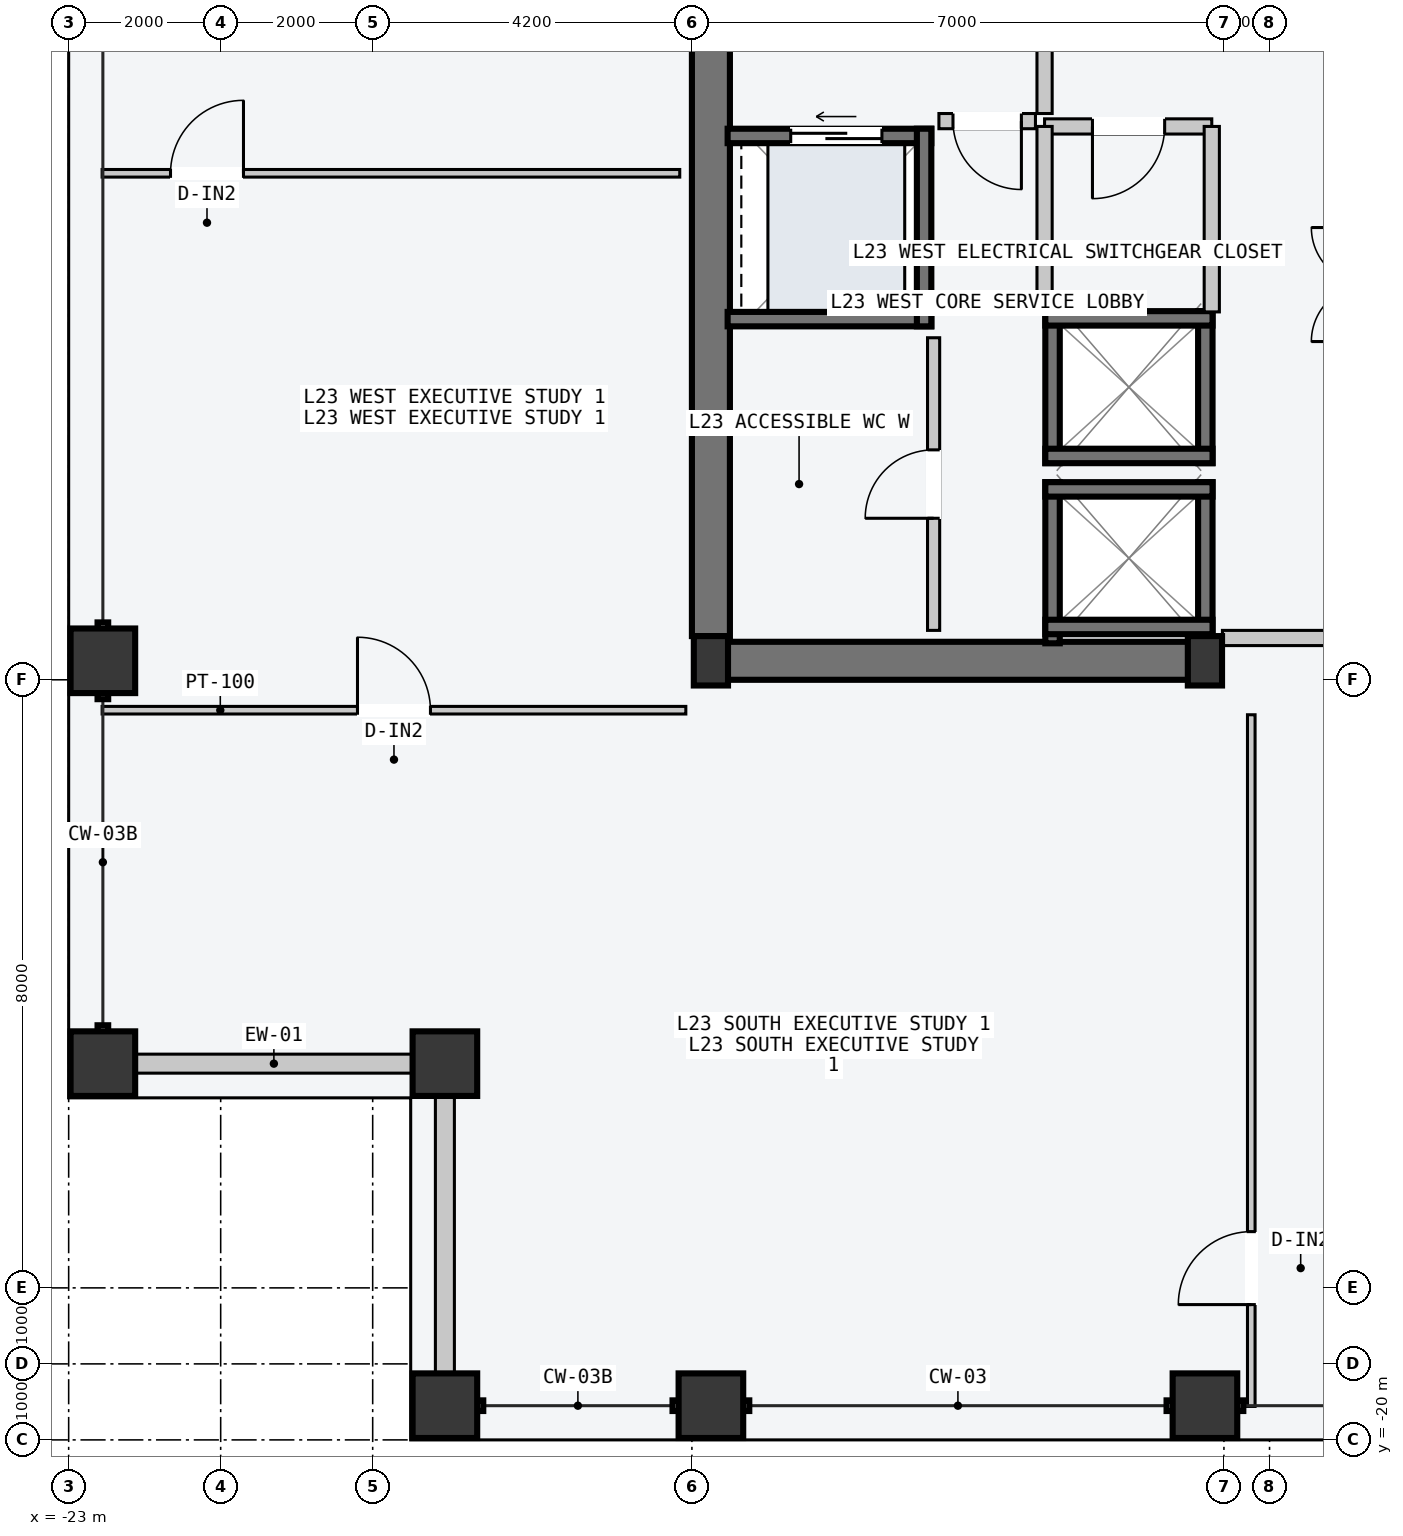
"""IFC4 building model, lengths in metres.
Left out: names, types, materials, properties, quantities, classifications, styles, units other than length and angle.
Written with IfcOpenShell. Run it as: python <this file> out.ifc"""

import sys

from ifc_helpers import new_model, si_unit, direction, frame, frame_2d, origin, origin_2d, place, context, subcontext, project, spatial, rectangle, hollow_rectangle, i_section, extrude, element, fill, save


model = new_model("IFC4")
c1 = context("Model", 3, precision=1e-05, world=origin(), true_north=direction((0.0, 1.0)))
c2 = subcontext(c1, "Body", "Model", "MODEL_VIEW")
j1 = project(units=[si_unit("LENGTHUNIT", "METRE"), si_unit("PLANEANGLEUNIT", "RADIAN")], contexts=[c1])
p1 = place(None, origin())
s1 = spatial("IfcSite", under=j1, at=p1, CompositionType="ELEMENT")
p2 = place(p1, origin())
s2 = spatial("IfcBuilding", under=s1, at=p2, CompositionType="ELEMENT")
p3 = place(p2, frame((0.0, 0.0, 91.8)))
s3 = spatial("IfcBuildingStorey", under=s2, at=p3, CompositionType="ELEMENT", Elevation=91.8)
p4 = place(p3, frame((-14.53, -9.75, -0.2), z_axis=(0.0, 0.0, 1.0), x_axis=(1.0, 0.0, 0.0)))
e1 = element("IfcWall", 1, at=p4, inside=s3, PredefinedType="SHEAR", context=c2, shape_type="SweptSolid", body=[
    extrude(rectangle(XDim=6.46, YDim=0.5, at=frame_2d((3.23, 0.0))), origin(), (0.0, 0.0, 1.0), 3.6),
])
p5 = place(p3, frame((-14.55, -9.425, -0.2), z_axis=(0.0, 0.0, 1.0), x_axis=(0.0, 1.0, 0.0)))
e2 = element("IfcWall", 2, at=p5, inside=s3, PredefinedType="SHEAR", context=c2, shape_type="SweptSolid", body=[
    extrude(rectangle(XDim=9.1, YDim=0.5, at=frame_2d((4.55, 0.0))), origin(), (0.0, 0.0, 1.0), 3.6),
])
for number, where, z_axis, x_axis in (
    (3, (-14.55, -9.75, 0.0), (0.0, 0.0, 1.0), (1.0, 0.0, 0.0)),
    (4, (-8.05, -9.75, 0.0), (0.0, 0.0, 1.0), (1.0, 0.0, 0.0)),
):
    element("IfcColumn", number, at=place(p3, frame(where, z_axis=z_axis, x_axis=x_axis)), inside=s3, PredefinedType="COLUMN", context=c2, shape_type="SweptSolid", body=[
        extrude(i_section(OverallWidth=0.45, OverallDepth=0.65, WebThickness=0.025, FlangeThickness=0.04, at=origin_2d()), origin(), (0.0, 0.0, 1.0), 3.6),
    ])
for number, where, z_axis, x_axis in (
    (5, (-18.05, -19.55, 0.0), (0.0, 0.0, 1.0), (1.0, 0.0, 0.0)),
    (6, (-14.55, -19.55, 0.0), (0.0, 0.0, 1.0), (1.0, 0.0, 0.0)),
    (7, (-8.05, -19.55, 0.0), (0.0, 0.0, 1.0), (1.0, 0.0, 0.0)),
    (8, (-22.55, -15.05, 0.0), (0.0, 0.0, 1.0), (0.0, 1.0, 0.0)),
    (9, (-22.55, -9.75, 0.0), (0.0, 0.0, 1.0), (0.0, 1.0, 0.0)),
    (10, (-18.05, -15.05, 0.0), (0.0, 0.0, 1.0), (1.0, 0.0, 0.0)),
):
    element("IfcColumn", number, at=place(p3, frame(where, z_axis=z_axis, x_axis=x_axis)), inside=s3, PredefinedType="COLUMN", context=c2, shape_type="SweptSolid", body=[
        extrude(hollow_rectangle(XDim=0.85, YDim=0.85, WallThickness=0.04, at=origin_2d()), origin(), (0.0, 0.0, 1.0), 3.6),
    ])
for number, where, z_axis, x_axis in (
    (11, (-22.115, -15.05, 0.0), (0.0, 0.0, 1.0), (1.0, 0.0, 0.0)),
    (12, (-18.05, -19.115, 0.0), (0.0, 0.0, 1.0), (0.0, 1.0, 0.0)),
):
    element("IfcWall", number, at=place(p3, frame(where, z_axis=z_axis, x_axis=x_axis)), inside=s3, PredefinedType="STANDARD", context=c2, shape_type="SweptSolid", body=[
        extrude(rectangle(XDim=3.63, YDim=0.25, at=frame_2d((1.815, 0.0))), origin(), (0.0, 0.0, 1.0), 2.7),
    ])
for number, where, z_axis, x_axis in (
    (13, (-8.045, -9.52, -0.2), (0.0, 0.0, 1.0), (0.0, 1.0, 0.0)),
    (14, (-10.055, -9.52, -0.2), (0.0, 0.0, 1.0), (0.0, 1.0, 0.0)),
):
    element("IfcWall", number, at=place(p3, frame(where, z_axis=z_axis, x_axis=x_axis)), inside=s3, PredefinedType="SOLIDWALL", context=c2, shape_type="SweptSolid", body=[
        extrude(rectangle(XDim=2.12, YDim=0.19, at=frame_2d((1.06, 0.0))), origin(), (0.0, 0.0, 1.0), 3.6),
    ])
for number, where, z_axis, x_axis in (
    (15, (-10.15, -7.495, -0.2), (0.0, 0.0, 1.0), (1.0, 0.0, 0.0)),
    (16, (-10.15, -9.305, -0.2), (0.0, 0.0, 1.0), (1.0, 0.0, 0.0)),
):
    element("IfcWall", number, at=place(p3, frame(where, z_axis=z_axis, x_axis=x_axis)), inside=s3, PredefinedType="SOLIDWALL", context=c2, shape_type="SweptSolid", body=[
        extrude(rectangle(XDim=2.2, YDim=0.19, at=frame_2d((1.1, 0.0))), origin(), (0.0, 0.0, 1.0), 3.6),
    ])
for number, where, z_axis, x_axis in (
    (17, (-8.045, -7.15, -0.2), (0.0, 0.0, 1.0), (0.0, 1.0, 0.0)),
    (18, (-10.055, -7.15, -0.2), (0.0, 0.0, 1.0), (0.0, 1.0, 0.0)),
):
    element("IfcWall", number, at=place(p3, frame(where, z_axis=z_axis, x_axis=x_axis)), inside=s3, PredefinedType="SOLIDWALL", context=c2, shape_type="SweptSolid", body=[
        extrude(rectangle(XDim=2.0, YDim=0.19, at=frame_2d((1.0, 0.0))), origin(), (0.0, 0.0, 1.0), 3.6),
    ])
for number, where, z_axis, x_axis in (
    (19, (-10.15, -5.245, -0.2), (0.0, 0.0, 1.0), (1.0, 0.0, 0.0)),
    (20, (-10.15, -7.055, -0.2), (0.0, 0.0, 1.0), (1.0, 0.0, 0.0)),
):
    element("IfcWall", number, at=place(p3, frame(where, z_axis=z_axis, x_axis=x_axis)), inside=s3, PredefinedType="SOLIDWALL", context=c2, shape_type="SweptSolid", body=[
        extrude(rectangle(XDim=2.2, YDim=0.19, at=frame_2d((1.1, 0.0))), origin(), (0.0, 0.0, 1.0), 3.6),
    ])
p6 = place(p3, frame((-14.33, -2.845, -0.2), z_axis=(0.0, 0.0, 1.0), x_axis=(1.0, 0.0, 0.0)))
e21 = element("IfcWall", 21, at=p6, inside=s3, PredefinedType="SOLIDWALL", context=c2, shape_type="SweptSolid", body=[
    extrude(rectangle(XDim=2.68, YDim=0.19, at=frame_2d((1.34, 0.0))), origin(), (0.0, 0.0, 1.0), 3.6),
])
p7 = place(p6, frame((0.83, 0.0, 0.2)))
e22 = element("IfcOpeningElement", 22, at=p7, cuts=e21, PredefinedType="OPENING", context=c2, shape_type="SweptSolid", body=[
    extrude(rectangle(XDim=1.2, YDim=2.2, at=frame_2d((0.6, 1.1))), frame((0.0, 0.105, 0.0), z_axis=(0.0, -1.0, 0.0), x_axis=(1.0, 0.0, 0.0)), (0.0, 0.0, 1.0), 0.21),
])
p8 = place(p3, frame((-14.33, -5.255, -0.2), z_axis=(0.0, 0.0, 1.0), x_axis=(1.0, 0.0, 0.0)))
e23 = element("IfcWall", 23, at=p8, inside=s3, PredefinedType="SOLIDWALL", context=c2, shape_type="SweptSolid", body=[
    extrude(rectangle(XDim=2.68, YDim=0.19, at=frame_2d((1.34, 0.0))), origin(), (0.0, 0.0, 1.0), 3.6),
])
p9 = place(p3, frame((-11.745, -5.35, -0.2), z_axis=(0.0, 0.0, 1.0), x_axis=(0.0, 1.0, 0.0)))
e24 = element("IfcWall", 24, at=p9, inside=s3, PredefinedType="SOLIDWALL", context=c2, shape_type="SweptSolid", body=[
    extrude(rectangle(XDim=2.6, YDim=0.19, at=frame_2d((1.3, 0.0))), origin(), (0.0, 0.0, 1.0), 3.6),
])
p10 = place(p3, frame((-6.02, -9.45, 0.0), z_axis=(0.0, 0.0, 1.0), x_axis=(-1.0, 0.0, 0.0)))
e25 = element("IfcWall", 25, at=p10, inside=s3, PredefinedType="PARTITIONING", context=c2, shape_type="SweptSolid", body=[
    extrude(rectangle(XDim=1.8, YDim=0.2, at=frame_2d((0.9, 0.0))), origin(), (0.0, 0.0, 1.0), 3.4),
])
p11 = place(p3, frame((-10.16, -2.55, 0.0), z_axis=(0.0, 0.0, 1.0), x_axis=(0.0, 1.0, 0.0)))
e26 = element("IfcWall", 26, at=p11, inside=s3, PredefinedType="PARTITIONING", context=c2, shape_type="SweptSolid", body=[
    extrude(rectangle(XDim=3.4, YDim=0.2, at=frame_2d((1.7, 0.0))), origin(), (0.0, 0.0, 1.0), 3.4),
])
p12 = place(p11, frame((1.3, 0.0, 0.0)))
e27 = element("IfcOpeningElement", 27, at=p12, cuts=e26, PredefinedType="OPENING", context=c2, shape_type="SweptSolid", body=[
    extrude(rectangle(XDim=1.1, YDim=2.15, at=frame_2d((0.55, 1.075))), frame((0.0, 0.11, 0.0), z_axis=(0.0, -1.0, 0.0), x_axis=(1.0, 0.0, 0.0)), (0.0, 0.0, 1.0), 0.22),
])
p13 = place(p3, frame((-10.28, -2.65, 0.0), z_axis=(0.0, 0.0, 1.0), x_axis=(-1.0, 0.0, 0.0)))
e28 = element("IfcWall", 28, at=p13, inside=s3, PredefinedType="PARTITIONING", context=c2, shape_type="SweptSolid", body=[
    extrude(rectangle(XDim=1.27, YDim=0.2, at=frame_2d((0.635, 0.0))), origin(), (0.0, 0.0, 1.0), 3.4),
])
p14 = place(p13, frame((0.185, 0.0, 0.0)))
e29 = element("IfcOpeningElement", 29, at=p14, cuts=e28, PredefinedType="OPENING", context=c2, shape_type="SweptSolid", body=[
    extrude(rectangle(XDim=0.9, YDim=2.15, at=frame_2d((0.45, 1.075))), frame((0.0, 0.11, 0.0), z_axis=(0.0, -1.0, 0.0), x_axis=(1.0, 0.0, 0.0)), (0.0, 0.0, 1.0), 0.22),
])
p15 = place(p3, frame((-7.96, -2.72, 0.0), z_axis=(0.0, 0.0, 1.0), x_axis=(-1.0, 0.0, 0.0)))
e30 = element("IfcWall", 30, at=p15, inside=s3, PredefinedType="PARTITIONING", context=c2, shape_type="SweptSolid", body=[
    extrude(rectangle(XDim=2.2, YDim=0.2, at=frame_2d((1.1, 0.0))), origin(), (0.0, 0.0, 1.0), 3.4),
])
p16 = place(p15, frame((0.62, 0.0, 0.0)))
e31 = element("IfcOpeningElement", 31, at=p16, cuts=e30, PredefinedType="OPENING", context=c2, shape_type="SweptSolid", body=[
    extrude(rectangle(XDim=0.95, YDim=2.1, at=frame_2d((0.475, 1.05))), frame((0.0, 0.11, 0.0), z_axis=(0.0, -1.0, 0.0), x_axis=(1.0, 0.0, 0.0)), (0.0, 0.0, 1.0), 0.22),
])
for number, where, z_axis, x_axis in (
    (32, (-7.96, -5.16, 0.0), (0.0, 0.0, 1.0), (0.0, 1.0, 0.0)),
    (33, (-10.16, -5.16, 0.0), (0.0, 0.0, 1.0), (0.0, 1.0, 0.0)),
):
    element("IfcWall", number, at=place(p3, frame(where, z_axis=z_axis, x_axis=x_axis)), inside=s3, PredefinedType="PARTITIONING", context=c2, shape_type="SweptSolid", body=[
        extrude(rectangle(XDim=2.44, YDim=0.2, at=frame_2d((1.22, 0.0))), origin(), (0.0, 0.0, 1.0), 3.4),
    ])
p17 = place(p3, frame((-11.62, -9.35, 0.0), z_axis=(0.0, 0.0, 1.0), x_axis=(0.0, 1.0, 0.0)))
e34 = element("IfcWall", 34, at=p17, inside=s3, PredefinedType="PARTITIONING", context=c2, shape_type="SweptSolid", body=[
    extrude(rectangle(XDim=3.85, YDim=0.16, at=frame_2d((1.925, 0.0))), origin(), (0.0, 0.0, 1.0), 3.4),
])
p18 = place(p17, frame((1.475, 0.0, 0.0)))
e35 = element("IfcOpeningElement", 35, at=p18, cuts=e34, PredefinedType="OPENING", context=c2, shape_type="SweptSolid", body=[
    extrude(rectangle(XDim=0.9, YDim=2.15, at=frame_2d((0.45, 1.075))), frame((0.0, 0.09, 0.0), z_axis=(0.0, -1.0, 0.0), x_axis=(1.0, 0.0, 0.0)), (0.0, 0.0, 1.0), 0.18),
])
p19 = place(p3, frame((-7.44, -19.56, 0.0), z_axis=(0.0, 0.0, 1.0), x_axis=(0.0, 1.0, 0.0)))
e36 = element("IfcWall", 36, at=p19, inside=s3, PredefinedType="PARTITIONING", context=c2, shape_type="SweptSolid", body=[
    extrude(rectangle(XDim=9.1, YDim=0.1, at=frame_2d((4.55, 0.0))), origin(), (0.0, 0.0, 1.0), 3.4),
])
p20 = place(p19, frame((1.34, 0.0, 0.0)))
e37 = element("IfcOpeningElement", 37, at=p20, cuts=e36, PredefinedType="OPENING", context=c2, shape_type="SweptSolid", body=[
    extrude(rectangle(XDim=0.96, YDim=2.18, at=frame_2d((0.48, 1.09))), frame((0.0, 0.06, 0.0), z_axis=(0.0, -1.0, 0.0), x_axis=(1.0, 0.0, 0.0)), (0.0, 0.0, 1.0), 0.12),
])
p21 = place(p3, frame((-22.56, -10.4, 0.0), z_axis=(0.0, 0.0, 1.0), x_axis=(1.0, 0.0, 0.0)))
e38 = element("IfcWall", 38, at=p21, inside=s3, PredefinedType="PARTITIONING", context=c2, shape_type="SweptSolid", body=[
    extrude(rectangle(XDim=7.68, YDim=0.1, at=frame_2d((3.84, 0.0))), origin(), (0.0, 0.0, 1.0), 3.4),
])
p22 = place(p21, frame((3.36, 0.0, 0.0)))
e39 = element("IfcOpeningElement", 39, at=p22, cuts=e38, PredefinedType="OPENING", context=c2, shape_type="SweptSolid", body=[
    extrude(rectangle(XDim=0.96, YDim=2.18, at=frame_2d((0.48, 1.09))), frame((0.0, 0.06, 0.0), z_axis=(0.0, -1.0, 0.0), x_axis=(1.0, 0.0, 0.0)), (0.0, 0.0, 1.0), 0.12),
])
p23 = place(p3, frame((-22.56, -3.336, 0.0), z_axis=(0.0, 0.0, 1.0), x_axis=(1.0, 0.0, 0.0)))
e40 = element("IfcWall", 40, at=p23, inside=s3, PredefinedType="PARTITIONING", context=c2, shape_type="SweptSolid", body=[
    extrude(rectangle(XDim=7.6, YDim=0.1, at=frame_2d((3.8, 0.0))), origin(), (0.0, 0.0, 1.0), 2.95),
])
p24 = place(p23, frame((0.9, 0.0, 0.0)))
e41 = element("IfcOpeningElement", 41, at=p24, cuts=e40, PredefinedType="OPENING", context=c2, shape_type="SweptSolid", body=[
    extrude(rectangle(XDim=0.96, YDim=2.18, at=frame_2d((0.48, 1.09))), frame((0.0, 0.06, 0.0), z_axis=(0.0, -1.0, 0.0), x_axis=(1.0, 0.0, 0.0)), (0.0, 0.0, 1.0), 0.12),
])
p25 = place(p7, origin())
e42 = element("IfcDoor", 42, at=p25, inside=s3, OperationType="SLIDING_TO_LEFT", PredefinedType="DOOR", context=c2, shape_type="SweptSolid", body=[
    extrude(rectangle(XDim=1.2, YDim=2.2, at=frame_2d((0.6, 1.1))), frame((0.0, 0.025, 0.0), z_axis=(0.0, -1.0, 0.0), x_axis=(1.0, 0.0, 0.0)), (0.0, 0.0, 1.0), 0.05),
])
fill(e22, e42)
p26 = place(p14, origin())
e43 = element("IfcDoor", 43, at=p26, inside=s3, OperationType="SINGLE_SWING_LEFT", PredefinedType="DOOR", context=c2, shape_type="SweptSolid", body=[
    extrude(rectangle(XDim=0.9, YDim=2.15, at=frame_2d((0.45, 1.075))), frame((0.0, 0.025, 0.0), z_axis=(0.0, -1.0, 0.0), x_axis=(1.0, 0.0, 0.0)), (0.0, 0.0, 1.0), 0.05),
])
fill(e29, e43)
p27 = place(p16, origin())
e44 = element("IfcDoor", 44, at=p27, inside=s3, OperationType="SINGLE_SWING_RIGHT", PredefinedType="DOOR", context=c2, shape_type="SweptSolid", body=[
    extrude(rectangle(XDim=0.95, YDim=2.1, at=frame_2d((0.475, 1.05))), frame((0.0, 0.025, 0.0), z_axis=(0.0, -1.0, 0.0), x_axis=(1.0, 0.0, 0.0)), (0.0, 0.0, 1.0), 0.05),
])
fill(e31, e44)
p28 = place(p18, origin())
e45 = element("IfcDoor", 45, at=p28, inside=s3, OperationType="SINGLE_SWING_LEFT", PredefinedType="DOOR", context=c2, shape_type="SweptSolid", body=[
    extrude(rectangle(XDim=0.9, YDim=2.15, at=frame_2d((0.45, 1.075))), frame((0.0, 0.025, 0.0), z_axis=(0.0, -1.0, 0.0), x_axis=(1.0, 0.0, 0.0)), (0.0, 0.0, 1.0), 0.05),
])
fill(e35, e45)
p29 = place(p20, origin())
e46 = element("IfcDoor", 46, at=p29, inside=s3, OperationType="SINGLE_SWING_LEFT", PredefinedType="DOOR", context=c2, shape_type="SweptSolid", body=[
    extrude(rectangle(XDim=0.96, YDim=2.18, at=frame_2d((0.48, 1.09))), frame((0.0, 0.025, 0.0), z_axis=(0.0, -1.0, 0.0), x_axis=(1.0, 0.0, 0.0)), (0.0, 0.0, 1.0), 0.05),
])
fill(e37, e46)
p30 = place(p22, origin())
e47 = element("IfcDoor", 47, at=p30, inside=s3, OperationType="SINGLE_SWING_LEFT", PredefinedType="DOOR", context=c2, shape_type="SweptSolid", body=[
    extrude(rectangle(XDim=0.96, YDim=2.18, at=frame_2d((0.48, 1.09))), frame((0.0, 0.025, 0.0), z_axis=(0.0, -1.0, 0.0), x_axis=(1.0, 0.0, 0.0)), (0.0, 0.0, 1.0), 0.05),
])
fill(e39, e47)
p31 = place(p24, origin())
e48 = element("IfcDoor", 48, at=p31, inside=s3, OperationType="SINGLE_SWING_RIGHT", PredefinedType="DOOR", context=c2, shape_type="SweptSolid", body=[
    extrude(rectangle(XDim=0.96, YDim=2.18, at=frame_2d((0.48, 1.09))), frame((0.0, 0.025, 0.0), z_axis=(0.0, -1.0, 0.0), x_axis=(1.0, 0.0, 0.0)), (0.0, 0.0, 1.0), 0.05),
])
fill(e41, e48)
save(model, sys.argv[1])
